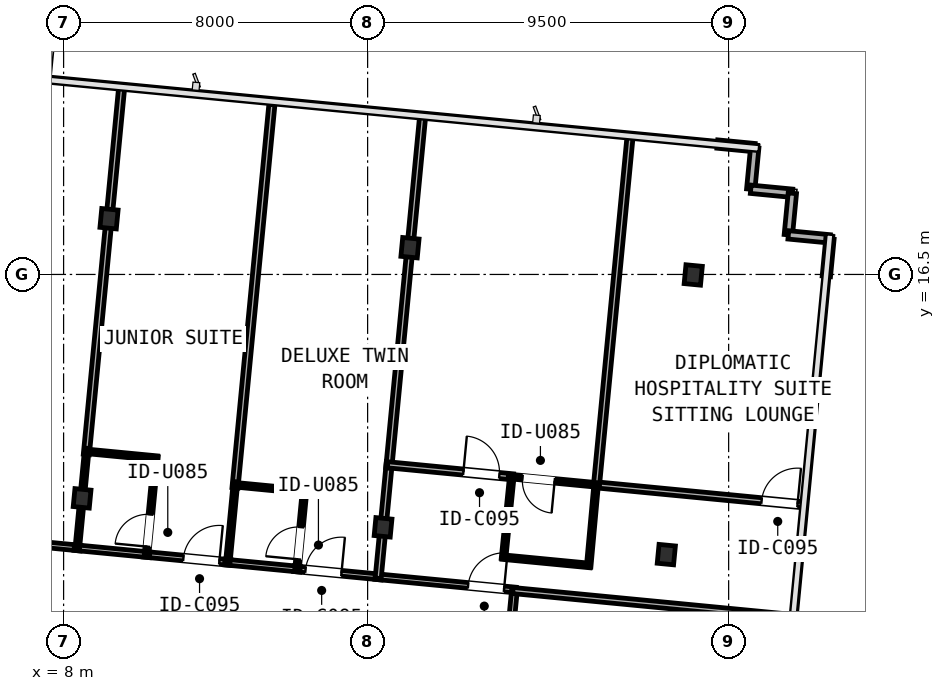
"""IFC4 building model, lengths in metres.
Left out: names, types, materials, properties, quantities, classifications, styles, units other than length and angle.
Written with IfcOpenShell. Run it as: python <this file> out.ifc"""

import sys

from ifc_helpers import new_model, si_unit, direction, frame, frame_2d, origin, origin_2d, place, context, subcontext, project, spatial, rectangle, i_section, extrude, element, fill, save


model = new_model("IFC4")
c1 = context("Model", 3, precision=1e-05, world=origin(), true_north=direction((0.0, 1.0)))
c2 = subcontext(c1, "Body", "Model", "MODEL_VIEW")
j1 = project(units=[si_unit("LENGTHUNIT", "METRE"), si_unit("PLANEANGLEUNIT", "RADIAN")], contexts=[c1])
p1 = place(None, origin())
s1 = spatial("IfcSite", under=j1, at=p1, CompositionType="ELEMENT")
p2 = place(p1, origin())
s2 = spatial("IfcBuilding", under=s1, at=p2, CompositionType="ELEMENT")
p3 = place(p2, frame((0.0, 0.0, 146.25)))
s3 = spatial("IfcBuildingStorey", under=s2, at=p3, CompositionType="ELEMENT", Elevation=146.25)
p4 = place(p3, frame((8.487, 10.609, 0.0), z_axis=(0.0, 0.0, 1.0), x_axis=(0.995396198367, -0.09584575252, 0.0)))
e1 = element("IfcColumn", 1, at=p4, inside=s3, PredefinedType="COLUMN", context=c2, shape_type="SweptSolid", body=[
    extrude(i_section(OverallWidth=0.424, OverallDepth=0.474, WebThickness=0.048, FlangeThickness=0.077, FilletRadius=0.031, at=origin_2d()), origin(), (0.0, 0.0, 1.0), 3.45),
])
p5 = place(p3, frame((9.195, 17.967, 0.0), z_axis=(0.0, 0.0, 1.0), x_axis=(0.995396198367, -0.09584575252, 0.0)))
e2 = element("IfcColumn", 2, at=p5, inside=s3, PredefinedType="COLUMN", context=c2, shape_type="SweptSolid", body=[
    extrude(i_section(OverallWidth=0.432, OverallDepth=0.498, WebThickness=0.056, FlangeThickness=0.089, FilletRadius=0.031, at=origin_2d()), origin(), (0.0, 0.0, 1.0), 3.45),
])
p6 = place(p3, frame((16.406, 9.846, 0.0), z_axis=(0.0, 0.0, 1.0), x_axis=(0.995396198367, -0.09584575252, 0.0)))
e3 = element("IfcColumn", 3, at=p6, inside=s3, PredefinedType="COLUMN", context=c2, shape_type="SweptSolid", body=[
    extrude(i_section(OverallWidth=0.424, OverallDepth=0.474, WebThickness=0.048, FlangeThickness=0.077, FilletRadius=0.031, at=origin_2d()), origin(), (0.0, 0.0, 1.0), 3.45),
])
for number, where, z_axis, x_axis in (
    (4, (17.115, 17.204, 0.0), (0.0, 0.0, 1.0), (0.995, -0.096, 0.0)),
    (5, (23.86, 9.128, 0.0), (0.0, 0.0, 1.0), (0.995, -0.096, 0.0)),
    (6, (24.568, 16.486, 0.0), (0.0, 0.0, 1.0), (0.995, -0.096, 0.0)),
):
    element("IfcColumn", number, at=place(p3, frame(where, z_axis=z_axis, x_axis=x_axis)), inside=s3, PredefinedType="COLUMN", context=c2, shape_type="SweptSolid", body=[
        extrude(i_section(OverallWidth=0.432, OverallDepth=0.498, WebThickness=0.056, FlangeThickness=0.089, FilletRadius=0.031, at=origin_2d()), origin(), (0.0, 0.0, 1.0), 3.45),
    ])
p7 = place(p3, frame((25.201, 19.931, 0.0), z_axis=(0.0, 0.0, 1.0), x_axis=(0.99541083642, -0.095693608655, 0.0)))
e7 = element("IfcWall", 7, at=p7, inside=s3, PredefinedType="STANDARD", context=c2, shape_type="SweptSolid", body=[
    extrude(rectangle(XDim=0.99, YDim=0.22, at=frame_2d((0.495, 0.0))), origin(), (0.0, 0.0, 1.0), 3.19),
])
p8 = place(p3, frame((26.187, 19.837, 0.0), z_axis=(0.0, 0.0, 1.0), x_axis=(-0.095657429048, -0.995414313875, 0.0)))
e8 = element("IfcWall", 8, at=p8, inside=s3, PredefinedType="STANDARD", context=c2, shape_type="SweptSolid", body=[
    extrude(rectangle(XDim=1.1, YDim=0.22, at=frame_2d((0.55, 0.0))), origin(), (0.0, 0.0, 1.0), 3.19),
])
p9 = place(p3, frame((26.082, 18.742, 0.0), z_axis=(0.0, 0.0, 1.0), x_axis=(0.995391116058, -0.095898519656, 0.0)))
e9 = element("IfcWall", 9, at=p9, inside=s3, PredefinedType="STANDARD", context=c2, shape_type="SweptSolid", body=[
    extrude(rectangle(XDim=1.1, YDim=0.22, at=frame_2d((0.55, 0.0))), origin(), (0.0, 0.0, 1.0), 3.19),
])
p10 = place(p3, frame((27.176, 18.636, 0.0), z_axis=(0.0, 0.0, 1.0), x_axis=(-0.095657429048, -0.995414313875, 0.0)))
e10 = element("IfcWall", 10, at=p10, inside=s3, PredefinedType="STANDARD", context=c2, shape_type="SweptSolid", body=[
    extrude(rectangle(XDim=1.1, YDim=0.22, at=frame_2d((0.55, 0.0))), origin(), (0.0, 0.0, 1.0), 3.19),
])
p11 = place(p3, frame((27.071, 17.541, 0.0), z_axis=(0.0, 0.0, 1.0), x_axis=(0.995391116058, -0.095898519656, 0.0)))
e11 = element("IfcWall", 11, at=p11, inside=s3, PredefinedType="STANDARD", context=c2, shape_type="SweptSolid", body=[
    extrude(rectangle(XDim=1.1, YDim=0.22, at=frame_2d((0.55, 0.0))), origin(), (0.0, 0.0, 1.0), 3.19),
])
p12 = place(p3, frame((28.166, 17.436, 0.0), z_axis=(0.0, 0.0, 1.0), x_axis=(-0.095693608655, -0.99541083642, 0.0)))
e12 = element("IfcWall", 12, at=p12, inside=s3, PredefinedType="STANDARD", context=c2, shape_type="SweptSolid", body=[
    extrude(rectangle(XDim=0.99, YDim=0.22, at=frame_2d((0.495, 0.0))), origin(), (0.0, 0.0, 1.0), 3.19),
])
p13 = place(p3, frame((2.799, 9.842, 0.0), z_axis=(0.0, 0.0, 1.0), x_axis=(0.995395844771, -0.095849424686, 0.0)))
e13 = element("IfcWall", 13, at=p13, inside=s3, PredefinedType="PARTITIONING", context=c2, shape_type="SweptSolid", body=[
    extrude(rectangle(XDim=5.67, YDim=0.15, at=frame_2d((2.835, 0.0))), origin(), (0.0, 0.0, 1.0), 2.479),
])
p14 = place(p13, frame((1.186, 0.0, 0.0)))
e14 = element("IfcOpeningElement", 14, at=p14, cuts=e13, PredefinedType="OPENING", context=c2, shape_type="SweptSolid", body=[
    extrude(rectangle(XDim=0.95, YDim=2.15, at=frame_2d((0.475, 1.075))), frame((0.0, 0.085, 0.0), z_axis=(0.0, -1.0, 0.0), x_axis=(1.0, 0.0, 0.0)), (0.0, 0.0, 1.0), 0.17),
])
p15 = place(p3, frame((10.101, 9.139, 0.0), z_axis=(0.0, 0.0, 1.0), x_axis=(0.995393345625, -0.095875374756, 0.0)))
e15 = element("IfcWall", 15, at=p15, inside=s3, PredefinedType="PARTITIONING", context=c2, shape_type="SweptSolid", body=[
    extrude(rectangle(XDim=2.312, YDim=0.15, at=frame_2d((1.156, 0.0))), origin(), (0.0, 0.0, 1.0), 2.718),
])
p16 = place(p15, frame((1.056, 0.0, 0.0)))
e16 = element("IfcOpeningElement", 16, at=p16, cuts=e15, PredefinedType="OPENING", context=c2, shape_type="SweptSolid", body=[
    extrude(rectangle(XDim=0.95, YDim=2.15, at=frame_2d((0.475, 1.075))), frame((0.0, 0.085, 0.0), z_axis=(0.0, -1.0, 0.0), x_axis=(1.0, 0.0, 0.0)), (0.0, 0.0, 1.0), 0.17),
])
p17 = place(p3, frame((8.28, 9.314, 0.0), z_axis=(0.0, 0.0, 1.0), x_axis=(0.995393086543, -0.095878064554, 0.0)))
e17 = element("IfcWall", 17, at=p17, inside=s3, PredefinedType="PARTITIONING", context=c2, shape_type="SweptSolid", body=[
    extrude(rectangle(XDim=1.994, YDim=0.15, at=frame_2d((0.997, 0.0))), origin(), (0.0, 0.0, 1.0), 2.479),
])
p18 = place(p3, frame((14.061, 8.758, 0.0), z_axis=(0.0, 0.0, 1.0), x_axis=(0.995393345625, -0.095875374756, 0.0)))
e18 = element("IfcWall", 18, at=p18, inside=s3, PredefinedType="PARTITIONING", context=c2, shape_type="SweptSolid", body=[
    extrude(rectangle(XDim=2.312, YDim=0.15, at=frame_2d((1.156, 0.0))), origin(), (0.0, 0.0, 1.0), 2.479),
])
p19 = place(p18, frame((0.306, 0.0, 0.0)))
e19 = element("IfcOpeningElement", 19, at=p19, cuts=e18, PredefinedType="OPENING", context=c2, shape_type="SweptSolid", body=[
    extrude(rectangle(XDim=0.95, YDim=2.15, at=frame_2d((0.475, 1.075))), frame((0.0, 0.085, 0.0), z_axis=(0.0, -1.0, 0.0), x_axis=(1.0, 0.0, 0.0)), (0.0, 0.0, 1.0), 0.17),
])
p20 = place(p3, frame((12.24, 8.933, 0.0), z_axis=(0.0, 0.0, 1.0), x_axis=(0.995405888026, -0.095745068196, 0.0)))
e20 = element("IfcWall", 20, at=p20, inside=s3, PredefinedType="PARTITIONING", context=c2, shape_type="SweptSolid", body=[
    extrude(rectangle(XDim=1.994, YDim=0.15, at=frame_2d((0.997, 0.0))), origin(), (0.0, 0.0, 1.0), 2.718),
])
p21 = place(p3, frame((16.199, 8.552, 0.0), z_axis=(0.0, 0.0, 1.0), x_axis=(0.995391104887, -0.095898635608, 0.0)))
e21 = element("IfcWall", 21, at=p21, inside=s3, PredefinedType="PARTITIONING", context=c2, shape_type="SweptSolid", body=[
    extrude(rectangle(XDim=3.722, YDim=0.15, at=frame_2d((1.861, 0.0))), origin(), (0.0, 0.0, 1.0), 2.479),
])
p22 = place(p21, frame((2.457, 0.0, 0.0)))
e22 = element("IfcOpeningElement", 22, at=p22, cuts=e21, PredefinedType="OPENING", context=c2, shape_type="SweptSolid", body=[
    extrude(rectangle(XDim=0.95, YDim=2.15, at=frame_2d((0.475, 1.075))), frame((0.0, 0.085, 0.0), z_axis=(0.0, -1.0, 0.0), x_axis=(1.0, 0.0, 0.0)), (0.0, 0.0, 1.0), 0.17),
])
p23 = place(p3, frame((19.866, 8.219, 0.0), z_axis=(0.0, 0.0, 1.0), x_axis=(-0.095773447772, -0.995403157872, 0.0)))
e23 = element("IfcWall", 23, at=p23, inside=s3, PredefinedType="PARTITIONING", context=c2, shape_type="SweptSolid", body=[
    extrude(rectangle(XDim=2.21, YDim=0.15, at=frame_2d((1.105, 0.0))), origin(), (0.0, 0.0, 1.0), 2.718),
])
p24 = place(p3, frame((9.178, 17.791, 0.0), z_axis=(0.0, 0.0, 1.0), x_axis=(-0.095826863488, -0.995398016993, 0.0)))
e24 = element("IfcWall", 24, at=p24, inside=s3, PredefinedType="PARTITIONING", context=c2, shape_type="SweptSolid", body=[
    extrude(rectangle(XDim=6.056, YDim=0.16, at=frame_2d((3.028, 0.0))), origin(), (0.0, 0.0, 1.0), 2.479),
])
p25 = place(p3, frame((9.533, 21.47, 0.0), z_axis=(0.0, 0.0, 1.0), x_axis=(-0.095859866796, -0.995394839216, 0.0)))
e25 = element("IfcWall", 25, at=p25, inside=s3, PredefinedType="PARTITIONING", context=c2, shape_type="SweptSolid", body=[
    extrude(rectangle(XDim=3.344, YDim=0.16, at=frame_2d((1.672, 0.0))), origin(), (0.0, 0.0, 1.0), 3.19),
])
p26 = place(p3, frame((8.47, 10.433, 0.0), z_axis=(0.0, 0.0, 1.0), x_axis=(-0.095831494917, -0.995397571115, 0.0)))
e26 = element("IfcWall", 26, at=p26, inside=s3, PredefinedType="PARTITIONING", context=c2, shape_type="SweptSolid", body=[
    extrude(rectangle(XDim=1.172, YDim=0.12, at=frame_2d((0.586, 0.0))), origin(), (0.0, 0.0, 1.0), 2.479),
])
p27 = place(p3, frame((8.614, 11.927, 0.0), z_axis=(0.0, 0.0, 1.0), x_axis=(-0.09590284245, -0.99539069958, 0.0)))
e27 = element("IfcWall", 27, at=p27, inside=s3, PredefinedType="PARTITIONING", context=c2, shape_type="SweptSolid", body=[
    extrude(rectangle(XDim=1.148, YDim=0.12, at=frame_2d((0.574, 0.0))), origin(), (0.0, 0.0, 1.0), 2.479),
])
p28 = place(p3, frame((10.179, 9.091, 0.0), z_axis=(0.0, 0.0, 1.0), x_axis=(0.095799078022, 0.995400691506, 0.0)))
e28 = element("IfcWall", 28, at=p28, inside=s3, PredefinedType="PARTITIONING", context=c2, shape_type="SweptSolid", body=[
    extrude(rectangle(XDim=2.63, YDim=0.12, at=frame_2d((1.315, 0.0))), origin(), (0.0, 0.0, 1.0), 2.479),
])
p29 = place(p28, frame((0.247, 0.0, 0.0)))
e29 = element("IfcOpeningElement", 29, at=p29, cuts=e28, PredefinedType="OPENING", context=c2, shape_type="SweptSolid", body=[
    extrude(rectangle(XDim=0.85, YDim=2.1, at=frame_2d((0.425, 1.05))), frame((0.0, 0.07, 0.0), z_axis=(0.0, -1.0, 0.0), x_axis=(1.0, 0.0, 0.0)), (0.0, 0.0, 1.0), 0.14),
])
p30 = place(p3, frame((10.467, 11.666, 0.0), z_axis=(0.0, 0.0, 1.0), x_axis=(-0.995405983929, 0.095744071139, 0.0)))
e30 = element("IfcWall", 30, at=p30, inside=s3, PredefinedType="PARTITIONING", context=c2, shape_type="SweptSolid", body=[
    extrude(rectangle(XDim=1.91, YDim=0.12, at=frame_2d((0.955, 0.0))), origin(), (0.0, 0.0, 1.0), 2.479),
])
p31 = place(p3, frame((13.481, 20.97, 0.0), z_axis=(0.0, 0.0, 1.0), x_axis=(-0.095852900965, -0.995395510024, 0.0)))
e31 = element("IfcWall", 31, at=p31, inside=s3, PredefinedType="PARTITIONING", context=c2, shape_type="SweptSolid", body=[
    extrude(rectangle(XDim=10.132, YDim=0.16, at=frame_2d((5.066, 0.0))), origin(), (0.0, 0.0, 1.0), 2.558),
])
p32 = place(p3, frame((12.526, 11.048, 0.0), z_axis=(0.0, 0.0, 1.0), x_axis=(-0.095875173929, -0.995393364969, 0.0)))
e32 = element("IfcWall", 32, at=p32, inside=s3, PredefinedType="PARTITIONING", context=c2, shape_type="SweptSolid", body=[
    extrude(rectangle(XDim=2.172, YDim=0.12, at=frame_2d((1.086, 0.0))), origin(), (0.0, 0.0, 1.0), 2.479),
])
p33 = place(p3, frame((14.139, 8.71, 0.0), z_axis=(0.0, 0.0, 1.0), x_axis=(0.095825980341, 0.995398102013, 0.0)))
e33 = element("IfcWall", 33, at=p33, inside=s3, PredefinedType="PARTITIONING", context=c2, shape_type="SweptSolid", body=[
    extrude(rectangle(XDim=2.13, YDim=0.12, at=frame_2d((1.065, 0.0))), origin(), (0.0, 0.0, 1.0), 2.479),
])
p34 = place(p33, frame((0.296, 0.0, 0.0)))
e34 = element("IfcOpeningElement", 34, at=p34, cuts=e33, PredefinedType="OPENING", context=c2, shape_type="SweptSolid", body=[
    extrude(rectangle(XDim=0.85, YDim=2.1, at=frame_2d((0.425, 1.05))), frame((0.0, 0.07, 0.0), z_axis=(0.0, -1.0, 0.0), x_axis=(1.0, 0.0, 0.0)), (0.0, 0.0, 1.0), 0.14),
])
p35 = place(p3, frame((14.379, 10.787, 0.0), z_axis=(0.0, 0.0, 1.0), x_axis=(-0.995393793358, 0.095870726213, 0.0)))
e35 = element("IfcWall", 35, at=p35, inside=s3, PredefinedType="PARTITIONING", context=c2, shape_type="SweptSolid", body=[
    extrude(rectangle(XDim=1.91, YDim=0.12, at=frame_2d((0.955, 0.0))), origin(), (0.0, 0.0, 1.0), 2.718),
])
p36 = place(p3, frame((16.389, 9.671, 0.0), z_axis=(0.0, 0.0, 1.0), x_axis=(-0.095811626391, -0.995399483749, 0.0)))
e36 = element("IfcWall", 36, at=p36, inside=s3, PredefinedType="PARTITIONING", context=c2, shape_type="SweptSolid", body=[
    extrude(rectangle(XDim=1.172, YDim=0.16, at=frame_2d((0.586, 0.0))), origin(), (0.0, 0.0, 1.0), 2.479),
])
p37 = place(p3, frame((16.572, 11.57, 0.0), z_axis=(0.0, 0.0, 1.0), x_axis=(-0.095867871334, -0.99539406832, 0.0)))
e37 = element("IfcWall", 37, at=p37, inside=s3, PredefinedType="PARTITIONING", context=c2, shape_type="SweptSolid", body=[
    extrude(rectangle(XDim=1.556, YDim=0.16, at=frame_2d((0.778, 0.0))), origin(), (0.0, 0.0, 1.0), 2.479),
])
p38 = place(p3, frame((17.098, 17.029, 0.0), z_axis=(0.0, 0.0, 1.0), x_axis=(-0.095831010877, -0.995397617716, 0.0)))
e38 = element("IfcWall", 38, at=p38, inside=s3, PredefinedType="PARTITIONING", context=c2, shape_type="SweptSolid", body=[
    extrude(rectangle(XDim=5.648, YDim=0.16, at=frame_2d((2.824, 0.0))), origin(), (0.0, 0.0, 1.0), 2.479),
])
p39 = place(p3, frame((17.452, 20.708, 0.0), z_axis=(0.0, 0.0, 1.0), x_axis=(-0.095859866796, -0.995394839216, 0.0)))
e39 = element("IfcWall", 39, at=p39, inside=s3, PredefinedType="PARTITIONING", context=c2, shape_type="SweptSolid", body=[
    extrude(rectangle(XDim=3.344, YDim=0.16, at=frame_2d((1.672, 0.0))), origin(), (0.0, 0.0, 1.0), 3.19),
])
p40 = place(p3, frame((16.525, 11.492, 0.0), z_axis=(0.0, 0.0, 1.0), x_axis=(0.995395561935, -0.095852361889, 0.0)))
e40 = element("IfcWall", 40, at=p40, inside=s3, PredefinedType="PARTITIONING", context=c2, shape_type="SweptSolid", body=[
    extrude(rectangle(XDim=3.324, YDim=0.16, at=frame_2d((1.662, 0.0))), origin(), (0.0, 0.0, 1.0), 2.479),
])
p41 = place(p40, frame((2.004, 0.0, 0.0)))
e41 = element("IfcOpeningElement", 41, at=p41, cuts=e40, PredefinedType="OPENING", context=c2, shape_type="SweptSolid", body=[
    extrude(rectangle(XDim=0.95, YDim=2.15, at=frame_2d((0.475, 1.075))), frame((0.0, 0.09, 0.0), z_axis=(0.0, -1.0, 0.0), x_axis=(1.0, 0.0, 0.0)), (0.0, 0.0, 1.0), 0.18),
])
p42 = place(p3, frame((21.973, 10.968, 0.0), z_axis=(0.0, 0.0, 1.0), x_axis=(0.99539730528, -0.095834256092, 0.0)))
e42 = element("IfcWall", 42, at=p42, inside=s3, PredefinedType="PARTITIONING", context=c2, shape_type="SweptSolid", body=[
    extrude(rectangle(XDim=5.574, YDim=0.16, at=frame_2d((2.787, 0.0))), origin(), (0.0, 0.0, 1.0), 2.558),
])
p43 = place(p42, frame((4.414, 0.0, 0.0)))
e43 = element("IfcOpeningElement", 43, at=p43, cuts=e42, PredefinedType="OPENING", context=c2, shape_type="SweptSolid", body=[
    extrude(rectangle(XDim=0.95, YDim=2.15, at=frame_2d((0.475, 1.075))), frame((0.0, 0.09, 0.0), z_axis=(0.0, -1.0, 0.0), x_axis=(1.0, 0.0, 0.0)), (0.0, 0.0, 1.0), 0.18),
])
p44 = place(p3, frame((19.798, 11.217, 0.0), z_axis=(0.0, 0.0, 1.0), x_axis=(-0.100620321887, -0.994924897077, 0.0)))
e44 = element("IfcWall", 44, at=p44, inside=s3, PredefinedType="PARTITIONING", context=c2, shape_type="SweptSolid", body=[
    extrude(rectangle(XDim=2.208, YDim=0.12, at=frame_2d((1.104, 0.0))), origin(), (0.0, 0.0, 1.0), 2.479),
])
p45 = place(p3, frame((19.54, 9.064, 0.0), z_axis=(0.0, 0.0, 1.0), x_axis=(0.995393658532, -0.095872126059, 0.0)))
e45 = element("IfcWall", 45, at=p45, inside=s3, PredefinedType="PARTITIONING", context=c2, shape_type="SweptSolid", body=[
    extrude(rectangle(XDim=2.33, YDim=0.12, at=frame_2d((1.165, 0.0))), origin(), (0.0, 0.0, 1.0), 2.718),
])
p46 = place(p3, frame((21.816, 8.805, 0.0), z_axis=(0.0, 0.0, 1.0), x_axis=(0.09110395288, 0.995841387857, 0.0)))
e46 = element("IfcWall", 46, at=p46, inside=s3, PredefinedType="PARTITIONING", context=c2, shape_type="SweptSolid", body=[
    extrude(rectangle(XDim=2.208, YDim=0.12, at=frame_2d((1.104, 0.0))), origin(), (0.0, 0.0, 1.0), 2.479),
])
p47 = place(p3, frame((27.236, 7.469, 0.0), z_axis=(0.0, 0.0, 1.0), x_axis=(-0.995396228159, 0.095845443117, 0.0)))
e47 = element("IfcWall", 47, at=p47, inside=s3, PredefinedType="PARTITIONING", context=c2, shape_type="SweptSolid", body=[
    extrude(rectangle(XDim=7.448, YDim=0.16, at=frame_2d((3.724, 0.0))), origin(), (0.0, 0.0, 1.0), 2.558),
])
p48 = place(p3, frame((22.911, 20.182, 0.0), z_axis=(0.0, 0.0, 1.0), x_axis=(-0.095851937807, -0.995395602772, 0.0)))
e48 = element("IfcWall", 48, at=p48, inside=s3, PredefinedType="PARTITIONING", context=c2, shape_type="SweptSolid", body=[
    extrude(rectangle(XDim=9.302, YDim=0.16, at=frame_2d((4.651, 0.0))), origin(), (0.0, 0.0, 1.0), 2.558),
])
p49 = place(p3, frame((22.063, 10.959, 0.0), z_axis=(0.0, 0.0, 1.0), x_axis=(-0.995398273854, 0.095824195322, 0.0)))
e49 = element("IfcWall", 49, at=p49, inside=s3, PredefinedType="PARTITIONING", context=c2, shape_type="SweptSolid", body=[
    extrude(rectangle(XDim=2.372, YDim=0.12, at=frame_2d((1.186, 0.0))), origin(), (0.0, 0.0, 1.0), 2.718),
])
p50 = place(p49, frame((1.146, 0.0, 0.0)))
e50 = element("IfcOpeningElement", 50, at=p50, cuts=e49, PredefinedType="OPENING", context=c2, shape_type="SweptSolid", body=[
    extrude(rectangle(XDim=0.85, YDim=2.1, at=frame_2d((0.425, 1.05))), frame((0.0, 0.07, 0.0), z_axis=(0.0, -1.0, 0.0), x_axis=(1.0, 0.0, 0.0)), (0.0, 0.0, 1.0), 0.14),
])
p51 = place(p16, frame((0.95, 0.0, 0.0), z_axis=(0.0, 0.0, 1.0), x_axis=(-1.0, 0.0, 0.0)))
e51 = element("IfcDoor", 51, at=p51, inside=s3, OperationType="SINGLE_SWING_RIGHT", PredefinedType="DOOR", context=c2, shape_type="SweptSolid", body=[
    extrude(rectangle(XDim=0.95, YDim=2.15, at=frame_2d((0.475, 1.075))), frame((0.0, 0.025, 0.0), z_axis=(0.0, -1.0, 0.0), x_axis=(1.0, 0.0, 0.0)), (0.0, 0.0, 1.0), 0.05),
])
fill(e16, e51)
p52 = place(p29, frame((0.85, 0.0, 0.0), z_axis=(0.0, 0.0, 1.0), x_axis=(-1.0, 0.0, 0.0)))
e52 = element("IfcDoor", 52, at=p52, inside=s3, OperationType="SINGLE_SWING_LEFT", PredefinedType="DOOR", context=c2, shape_type="SweptSolid", body=[
    extrude(rectangle(XDim=0.85, YDim=2.1, at=frame_2d((0.425, 1.05))), frame((0.0, 0.025, 0.0), z_axis=(0.0, -1.0, 0.0), x_axis=(1.0, 0.0, 0.0)), (0.0, 0.0, 1.0), 0.05),
])
fill(e29, e52)
p53 = place(p19, frame((0.95, 0.0, 0.0), z_axis=(0.0, 0.0, 1.0), x_axis=(-1.0, 0.0, 0.0)))
e53 = element("IfcDoor", 53, at=p53, inside=s3, OperationType="SINGLE_SWING_RIGHT", PredefinedType="DOOR", context=c2, shape_type="SweptSolid", body=[
    extrude(rectangle(XDim=0.95, YDim=2.15, at=frame_2d((0.475, 1.075))), frame((0.0, 0.025, 0.0), z_axis=(0.0, -1.0, 0.0), x_axis=(1.0, 0.0, 0.0)), (0.0, 0.0, 1.0), 0.05),
])
fill(e19, e53)
p54 = place(p34, origin())
e54 = element("IfcDoor", 54, at=p54, inside=s3, OperationType="SINGLE_SWING_LEFT", PredefinedType="DOOR", context=c2, shape_type="SweptSolid", body=[
    extrude(rectangle(XDim=0.85, YDim=2.1, at=frame_2d((0.425, 1.05))), frame((0.0, 0.025, 0.0), z_axis=(0.0, -1.0, 0.0), x_axis=(1.0, 0.0, 0.0)), (0.0, 0.0, 1.0), 0.05),
])
fill(e34, e54)
p55 = place(p22, frame((0.95, 0.0, 0.0), z_axis=(0.0, 0.0, 1.0), x_axis=(-1.0, 0.0, 0.0)))
e55 = element("IfcDoor", 55, at=p55, inside=s3, OperationType="SINGLE_SWING_RIGHT", PredefinedType="DOOR", context=c2, shape_type="SweptSolid", body=[
    extrude(rectangle(XDim=0.95, YDim=2.15, at=frame_2d((0.475, 1.075))), frame((0.0, 0.025, 0.0), z_axis=(0.0, -1.0, 0.0), x_axis=(1.0, 0.0, 0.0)), (0.0, 0.0, 1.0), 0.05),
])
fill(e22, e55)
p56 = place(p41, origin())
e56 = element("IfcDoor", 56, at=p56, inside=s3, OperationType="SINGLE_SWING_LEFT", PredefinedType="DOOR", context=c2, shape_type="SweptSolid", body=[
    extrude(rectangle(XDim=0.95, YDim=2.15, at=frame_2d((0.475, 1.075))), frame((0.0, 0.025, 0.0), z_axis=(0.0, -1.0, 0.0), x_axis=(1.0, 0.0, 0.0)), (0.0, 0.0, 1.0), 0.05),
])
fill(e41, e56)
p57 = place(p43, origin())
e57 = element("IfcDoor", 57, at=p57, inside=s3, OperationType="SINGLE_SWING_RIGHT", PredefinedType="DOOR", context=c2, shape_type="SweptSolid", body=[
    extrude(rectangle(XDim=0.95, YDim=2.15, at=frame_2d((0.475, 1.075))), frame((0.0, 0.025, 0.0), z_axis=(0.0, -1.0, 0.0), x_axis=(1.0, 0.0, 0.0)), (0.0, 0.0, 1.0), 0.05),
])
fill(e43, e57)
p58 = place(p50, frame((0.85, 0.0, 0.0), z_axis=(0.0, 0.0, 1.0), x_axis=(-1.0, 0.0, 0.0)))
e58 = element("IfcDoor", 58, at=p58, inside=s3, OperationType="SINGLE_SWING_LEFT", PredefinedType="DOOR", context=c2, shape_type="SweptSolid", body=[
    extrude(rectangle(XDim=0.85, YDim=2.1, at=frame_2d((0.425, 1.05))), frame((0.0, 0.025, 0.0), z_axis=(0.0, -1.0, 0.0), x_axis=(1.0, 0.0, 0.0)), (0.0, 0.0, 1.0), 0.05),
])
fill(e50, e58)
save(model, sys.argv[1])
